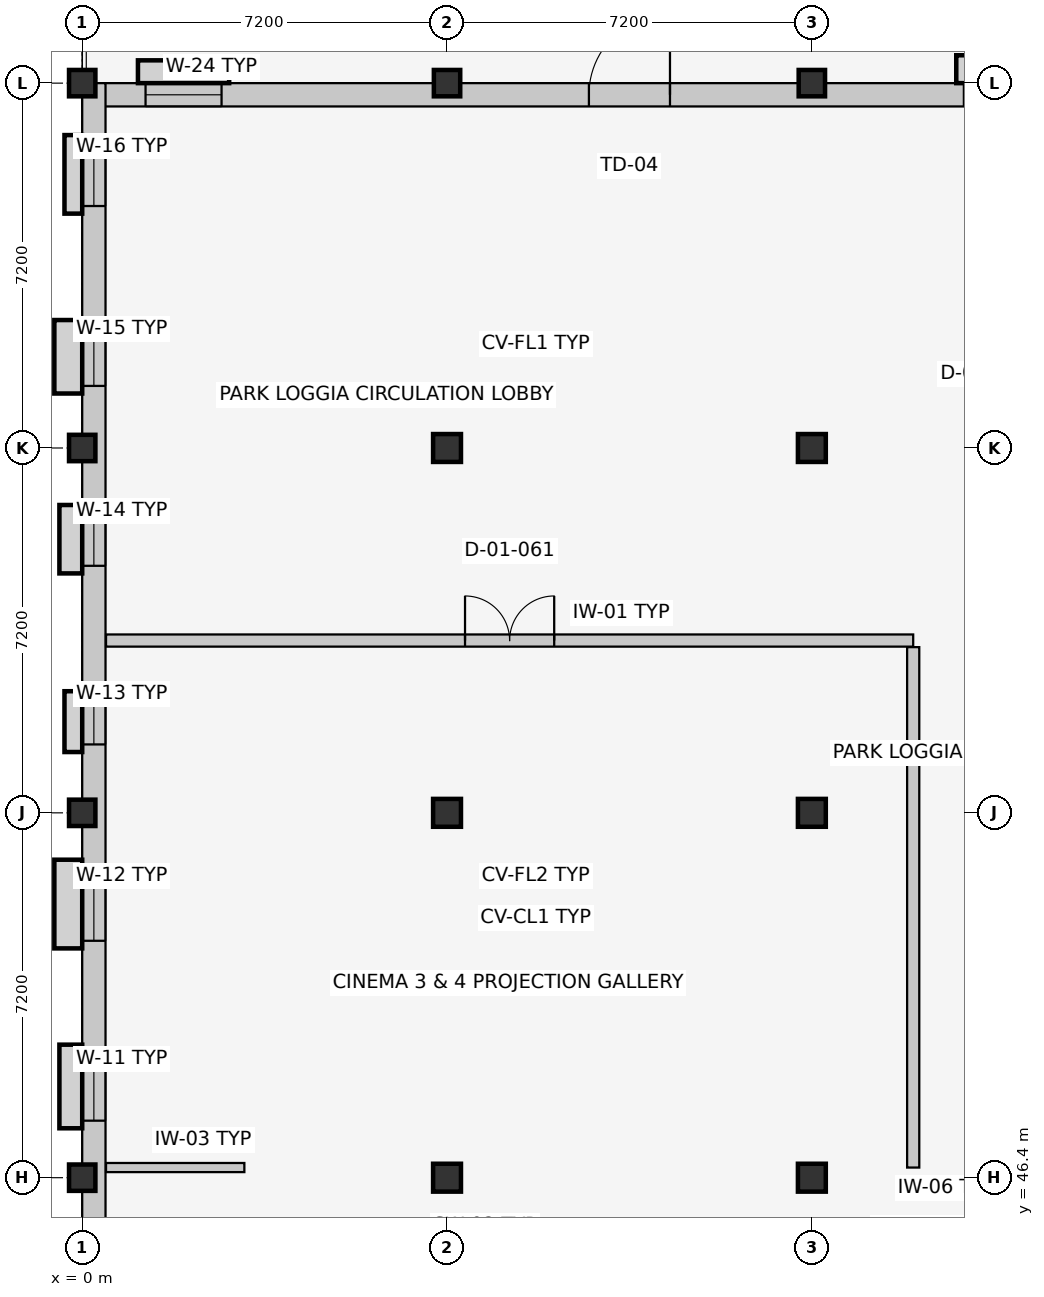
"""IFC4 building model, lengths in metres.
Left out: names, types, materials, properties, quantities, classifications, styles, units other than length and angle.
Written with IfcOpenShell. Run it as: python <this file> out.ifc"""

import sys

from ifc_helpers import new_model, si_unit, direction, frame, frame_2d, origin, origin_2d, place, context, subcontext, project, spatial, rectangle, extrude, element, fill, save


model = new_model("IFC4")
c1 = context("Model", 3, precision=1e-05, world=origin(), true_north=direction((0.0, 1.0)))
c2 = subcontext(c1, "Body", "Model", "MODEL_VIEW")
j1 = project(units=[si_unit("LENGTHUNIT", "METRE"), si_unit("PLANEANGLEUNIT", "RADIAN")], contexts=[c1])
p1 = place(None, origin())
s1 = spatial("IfcSite", under=j1, at=p1, CompositionType="ELEMENT")
p2 = place(p1, origin())
s2 = spatial("IfcBuilding", under=s1, at=p2, CompositionType="ELEMENT")
p3 = place(p2, frame((0.0, 0.0, 5.4)))
s3 = spatial("IfcBuildingStorey", under=s2, at=p3, CompositionType="ELEMENT", Elevation=5.4)
for number, where, z_axis, x_axis in (
    (1, (0.0, 46.4, 0.0), (0.0, 0.0, 1.0), (1.0, 0.0, 0.0)),
    (2, (0.0, 53.6, 0.0), (0.0, 0.0, 1.0), (1.0, 0.0, 0.0)),
    (3, (0.0, 60.8, 0.0), (0.0, 0.0, 1.0), (1.0, 0.0, 0.0)),
    (4, (0.0, 68.0, 0.0), (0.0, 0.0, 1.0), (1.0, 0.0, 0.0)),
):
    element("IfcColumn", number, at=place(p3, frame(where, z_axis=z_axis, x_axis=x_axis)), inside=s3, PredefinedType="COLUMN", context=c2, shape_type="SweptSolid", body=[
        extrude(rectangle(XDim=0.52, YDim=0.52, at=origin_2d()), origin(), (0.0, 0.0, 1.0), 4.2),
    ])
for number, where, z_axis, x_axis in (
    (5, (7.2, 46.4, 0.0), (0.0, 0.0, 1.0), (1.0, 0.0, 0.0)),
    (6, (7.2, 53.6, 0.0), (0.0, 0.0, 1.0), (1.0, 0.0, 0.0)),
    (7, (7.2, 60.8, 0.0), (0.0, 0.0, 1.0), (1.0, 0.0, 0.0)),
):
    element("IfcColumn", number, at=place(p3, frame(where, z_axis=z_axis, x_axis=x_axis)), inside=s3, PredefinedType="COLUMN", context=c2, shape_type="SweptSolid", body=[
        extrude(rectangle(XDim=0.55, YDim=0.55, at=origin_2d()), origin(), (0.0, 0.0, 1.0), 4.2),
    ])
p4 = place(p3, frame((7.2, 68.0, 0.0), z_axis=(0.0, 0.0, 1.0), x_axis=(1.0, 0.0, 0.0)))
e8 = element("IfcColumn", 8, at=p4, inside=s3, PredefinedType="COLUMN", context=c2, shape_type="SweptSolid", body=[
    extrude(rectangle(XDim=0.52, YDim=0.52, at=origin_2d()), origin(), (0.0, 0.0, 1.0), 4.2),
])
for number, where, z_axis, x_axis in (
    (9, (14.4, 46.4, 0.0), (0.0, 0.0, 1.0), (1.0, 0.0, 0.0)),
    (10, (14.4, 53.6, 0.0), (0.0, 0.0, 1.0), (1.0, 0.0, 0.0)),
    (11, (14.4, 60.8, 0.0), (0.0, 0.0, 1.0), (1.0, 0.0, 0.0)),
):
    element("IfcColumn", number, at=place(p3, frame(where, z_axis=z_axis, x_axis=x_axis)), inside=s3, PredefinedType="COLUMN", context=c2, shape_type="SweptSolid", body=[
        extrude(rectangle(XDim=0.55, YDim=0.55, at=origin_2d()), origin(), (0.0, 0.0, 1.0), 4.2),
    ])
p5 = place(p3, frame((14.4, 68.0, 0.0), z_axis=(0.0, 0.0, 1.0), x_axis=(1.0, 0.0, 0.0)))
e12 = element("IfcColumn", 12, at=p5, inside=s3, PredefinedType="COLUMN", context=c2, shape_type="SweptSolid", body=[
    extrude(rectangle(XDim=0.52, YDim=0.52, at=origin_2d()), origin(), (0.0, 0.0, 1.0), 4.2),
])
p6 = place(p3, frame((0.0, 67.77, 0.0), z_axis=(0.0, 0.0, 1.0), x_axis=(1.0, 0.0, 0.0)))
e13 = element("IfcWall", 13, at=p6, inside=s3, PredefinedType="SOLIDWALL", context=c2, shape_type="SweptSolid", body=[
    extrude(rectangle(XDim=36.0, YDim=0.46, at=frame_2d((18.0, 0.0))), origin(), (0.0, 0.0, 1.0), 3.235),
])
p7 = place(p6, frame((10.0, 0.0, 0.0)))
e14 = element("IfcOpeningElement", 14, at=p7, cuts=e13, PredefinedType="OPENING", context=c2, shape_type="SweptSolid", body=[
    extrude(rectangle(XDim=1.6, YDim=2.2, at=frame_2d((0.8, 1.1))), frame((0.0, 0.242, 0.0), z_axis=(0.0, -1.0, 0.0), x_axis=(1.0, 0.0, 0.0)), (0.0, 0.0, 1.0), 0.484),
])
p8 = place(p6, frame((1.25, 0.0, 0.9)))
e15 = element("IfcOpeningElement", 15, at=p8, cuts=e13, PredefinedType="OPENING", context=c2, shape_type="SweptSolid", body=[
    extrude(rectangle(XDim=1.5, YDim=1.75, at=frame_2d((0.75, 0.875))), frame((0.0, 0.242, 0.0), z_axis=(0.0, -1.0, 0.0), x_axis=(1.0, 0.0, 0.0)), (0.0, 0.0, 1.0), 0.484),
])
p9 = place(p6, frame((17.4, 0.0, 0.9)))
e16 = element("IfcOpeningElement", 16, at=p9, cuts=e13, PredefinedType="OPENING", context=c2, shape_type="SweptSolid", body=[
    extrude(rectangle(XDim=1.2, YDim=1.35, at=frame_2d((0.6, 0.675))), frame((0.0, 0.242, 0.0), z_axis=(0.0, -1.0, 0.0), x_axis=(1.0, 0.0, 0.0)), (0.0, 0.0, 1.0), 0.484),
])
p10 = place(p6, frame((25.3, 0.0, 0.9)))
e17 = element("IfcOpeningElement", 17, at=p10, cuts=e13, PredefinedType="OPENING", context=c2, shape_type="SweptSolid", body=[
    extrude(rectangle(XDim=1.4, YDim=1.35, at=frame_2d((0.7, 0.675))), frame((0.0, 0.242, 0.0), z_axis=(0.0, -1.0, 0.0), x_axis=(1.0, 0.0, 0.0)), (0.0, 0.0, 1.0), 0.484),
])
p11 = place(p6, frame((33.475, 0.0, 0.9)))
e18 = element("IfcOpeningElement", 18, at=p11, cuts=e13, PredefinedType="OPENING", context=c2, shape_type="SweptSolid", body=[
    extrude(rectangle(XDim=1.05, YDim=1.45, at=frame_2d((0.525, 0.725))), frame((0.0, 0.242, 0.0), z_axis=(0.0, -1.0, 0.0), x_axis=(1.0, 0.0, 0.0)), (0.0, 0.0, 1.0), 0.484),
])
p12 = place(p3, frame((0.23, 39.2, 0.0), z_axis=(0.0, 0.0, 1.0), x_axis=(0.0, 1.0, 0.0)))
e19 = element("IfcWall", 19, at=p12, inside=s3, PredefinedType="SOLIDWALL", context=c2, shape_type="SweptSolid", body=[
    extrude(rectangle(XDim=28.8, YDim=0.46, at=frame_2d((14.4, 0.0))), origin(), (0.0, 0.0, 1.0), 3.195),
])
p13 = place(p12, frame((1.225, 0.0, 0.9)))
e20 = element("IfcOpeningElement", 20, at=p13, cuts=e19, PredefinedType="OPENING", context=c2, shape_type="SweptSolid", body=[
    extrude(rectangle(XDim=1.15, YDim=1.45, at=frame_2d((0.575, 0.725))), frame((0.0, 0.242, 0.0), z_axis=(0.0, -1.0, 0.0), x_axis=(1.0, 0.0, 0.0)), (0.0, 0.0, 1.0), 0.484),
])
p14 = place(p12, frame((4.775, 0.0, 0.9)))
e21 = element("IfcOpeningElement", 21, at=p14, cuts=e19, PredefinedType="OPENING", context=c2, shape_type="SweptSolid", body=[
    extrude(rectangle(XDim=1.25, YDim=1.45, at=frame_2d((0.625, 0.725))), frame((0.0, 0.242, 0.0), z_axis=(0.0, -1.0, 0.0), x_axis=(1.0, 0.0, 0.0)), (0.0, 0.0, 1.0), 0.484),
])
p15 = place(p12, frame((8.325, 0.0, 0.9)))
e22 = element("IfcOpeningElement", 22, at=p15, cuts=e19, PredefinedType="OPENING", context=c2, shape_type="SweptSolid", body=[
    extrude(rectangle(XDim=1.35, YDim=1.45, at=frame_2d((0.675, 0.725))), frame((0.0, 0.242, 0.0), z_axis=(0.0, -1.0, 0.0), x_axis=(1.0, 0.0, 0.0)), (0.0, 0.0, 1.0), 0.484),
])
p16 = place(p12, frame((11.875, 0.0, 0.9)))
e23 = element("IfcOpeningElement", 23, at=p16, cuts=e19, PredefinedType="OPENING", context=c2, shape_type="SweptSolid", body=[
    extrude(rectangle(XDim=1.45, YDim=1.45, at=frame_2d((0.725, 0.725))), frame((0.0, 0.242, 0.0), z_axis=(0.0, -1.0, 0.0), x_axis=(1.0, 0.0, 0.0)), (0.0, 0.0, 1.0), 0.484),
])
p17 = place(p12, frame((15.75, 0.0, 0.9)))
e24 = element("IfcOpeningElement", 24, at=p17, cuts=e19, PredefinedType="OPENING", context=c2, shape_type="SweptSolid", body=[
    extrude(rectangle(XDim=0.9, YDim=1.6, at=frame_2d((0.45, 0.8))), frame((0.0, 0.242, 0.0), z_axis=(0.0, -1.0, 0.0), x_axis=(1.0, 0.0, 0.0)), (0.0, 0.0, 1.0), 0.484),
])
p18 = place(p12, frame((19.275, 0.0, 0.9)))
e25 = element("IfcOpeningElement", 25, at=p18, cuts=e19, PredefinedType="OPENING", context=c2, shape_type="SweptSolid", body=[
    extrude(rectangle(XDim=1.05, YDim=1.6, at=frame_2d((0.525, 0.8))), frame((0.0, 0.242, 0.0), z_axis=(0.0, -1.0, 0.0), x_axis=(1.0, 0.0, 0.0)), (0.0, 0.0, 1.0), 0.484),
])
p19 = place(p12, frame((22.825, 0.0, 0.9)))
e26 = element("IfcOpeningElement", 26, at=p19, cuts=e19, PredefinedType="OPENING", context=c2, shape_type="SweptSolid", body=[
    extrude(rectangle(XDim=1.15, YDim=1.6, at=frame_2d((0.575, 0.8))), frame((0.0, 0.242, 0.0), z_axis=(0.0, -1.0, 0.0), x_axis=(1.0, 0.0, 0.0)), (0.0, 0.0, 1.0), 0.484),
])
p20 = place(p12, frame((26.375, 0.0, 0.9)))
e27 = element("IfcOpeningElement", 27, at=p20, cuts=e19, PredefinedType="OPENING", context=c2, shape_type="SweptSolid", body=[
    extrude(rectangle(XDim=1.25, YDim=1.6, at=frame_2d((0.625, 0.8))), frame((0.0, 0.242, 0.0), z_axis=(0.0, -1.0, 0.0), x_axis=(1.0, 0.0, 0.0)), (0.0, 0.0, 1.0), 0.484),
])
p21 = place(p3, frame((0.47, 46.6, 0.0), z_axis=(0.0, 0.0, 1.0), x_axis=(1.0, 0.0, 0.0)))
e28 = element("IfcWall", 28, at=p21, inside=s3, PredefinedType="PARTITIONING", context=c2, shape_type="SweptSolid", body=[
    extrude(rectangle(XDim=2.73, YDim=0.18, at=frame_2d((1.365, 0.0))), origin(), (0.0, 0.0, 1.0), 3.265),
])
p22 = place(p3, frame((0.47, 57.0, 0.0), z_axis=(0.0, 0.0, 1.0), x_axis=(1.0, 0.0, 0.0)))
e29 = element("IfcWall", 29, at=p22, inside=s3, PredefinedType="PARTITIONING", context=c2, shape_type="SweptSolid", body=[
    extrude(rectangle(XDim=15.93, YDim=0.24, at=frame_2d((7.965, 0.0))), origin(), (0.0, 0.0, 1.0), 3.94),
])
p23 = place(p22, frame((7.085, 0.0, 0.0)))
e30 = element("IfcOpeningElement", 30, at=p23, cuts=e29, PredefinedType="OPENING", context=c2, shape_type="SweptSolid", body=[
    extrude(rectangle(XDim=1.76, YDim=2.3, at=frame_2d((0.88, 1.15))), frame((0.0, 0.132, 0.0), z_axis=(0.0, -1.0, 0.0), x_axis=(1.0, 0.0, 0.0)), (0.0, 0.0, 1.0), 0.264),
])
p24 = place(p3, frame((16.4, 46.6, 0.0), z_axis=(0.0, 0.0, 1.0), x_axis=(0.0, 1.0, 0.0)))
e31 = element("IfcWall", 31, at=p24, inside=s3, PredefinedType="PARTITIONING", context=c2, shape_type="SweptSolid", body=[
    extrude(rectangle(XDim=10.27, YDim=0.24, at=frame_2d((5.135, 0.0))), origin(), (0.0, 0.0, 1.0), 3.94),
])
p25 = place(p7, origin())
e32 = element("IfcDoor", 32, at=p25, inside=s3, OperationType="SINGLE_SWING_RIGHT", PredefinedType="DOOR", context=c2, shape_type="SweptSolid", body=[
    extrude(rectangle(XDim=1.6, YDim=2.2, at=frame_2d((0.8, 1.1))), frame((0.0, 0.025, 0.0), z_axis=(0.0, -1.0, 0.0), x_axis=(1.0, 0.0, 0.0)), (0.0, 0.0, 1.0), 0.05),
])
fill(e14, e32)
p26 = place(p8, origin())
e33 = element("IfcWindow", 33, at=p26, inside=s3, PartitioningType="SINGLE_PANEL", PredefinedType="WINDOW", context=c2, shape_type="SweptSolid", body=[
    extrude(rectangle(XDim=1.5, YDim=1.75, at=frame_2d((0.75, 0.875))), frame((0.0, 0.03, 0.0), z_axis=(0.0, -1.0, 0.0), x_axis=(1.0, 0.0, 0.0)), (0.0, 0.0, 1.0), 0.06),
])
fill(e15, e33)
p27 = place(p15, origin())
e34 = element("IfcWindow", 34, at=p27, inside=s3, PartitioningType="SINGLE_PANEL", PredefinedType="WINDOW", context=c2, shape_type="SweptSolid", body=[
    extrude(rectangle(XDim=1.35, YDim=1.45, at=frame_2d((0.675, 0.725))), frame((0.0, 0.03, 0.0), z_axis=(0.0, -1.0, 0.0), x_axis=(1.0, 0.0, 0.0)), (0.0, 0.0, 1.0), 0.06),
])
fill(e22, e34)
p28 = place(p16, origin())
e35 = element("IfcWindow", 35, at=p28, inside=s3, PartitioningType="SINGLE_PANEL", PredefinedType="WINDOW", context=c2, shape_type="SweptSolid", body=[
    extrude(rectangle(XDim=1.45, YDim=1.45, at=frame_2d((0.725, 0.725))), frame((0.0, 0.03, 0.0), z_axis=(0.0, -1.0, 0.0), x_axis=(1.0, 0.0, 0.0)), (0.0, 0.0, 1.0), 0.06),
])
fill(e23, e35)
p29 = place(p17, origin())
e36 = element("IfcWindow", 36, at=p29, inside=s3, PartitioningType="SINGLE_PANEL", PredefinedType="WINDOW", context=c2, shape_type="SweptSolid", body=[
    extrude(rectangle(XDim=0.9, YDim=1.6, at=frame_2d((0.45, 0.8))), frame((0.0, 0.03, 0.0), z_axis=(0.0, -1.0, 0.0), x_axis=(1.0, 0.0, 0.0)), (0.0, 0.0, 1.0), 0.06),
])
fill(e24, e36)
p30 = place(p18, origin())
e37 = element("IfcWindow", 37, at=p30, inside=s3, PartitioningType="SINGLE_PANEL", PredefinedType="WINDOW", context=c2, shape_type="SweptSolid", body=[
    extrude(rectangle(XDim=1.05, YDim=1.6, at=frame_2d((0.525, 0.8))), frame((0.0, 0.03, 0.0), z_axis=(0.0, -1.0, 0.0), x_axis=(1.0, 0.0, 0.0)), (0.0, 0.0, 1.0), 0.06),
])
fill(e25, e37)
p31 = place(p19, origin())
e38 = element("IfcWindow", 38, at=p31, inside=s3, PartitioningType="SINGLE_PANEL", PredefinedType="WINDOW", context=c2, shape_type="SweptSolid", body=[
    extrude(rectangle(XDim=1.15, YDim=1.6, at=frame_2d((0.575, 0.8))), frame((0.0, 0.03, 0.0), z_axis=(0.0, -1.0, 0.0), x_axis=(1.0, 0.0, 0.0)), (0.0, 0.0, 1.0), 0.06),
])
fill(e26, e38)
p32 = place(p20, origin())
e39 = element("IfcWindow", 39, at=p32, inside=s3, PartitioningType="SINGLE_PANEL", PredefinedType="WINDOW", context=c2, shape_type="SweptSolid", body=[
    extrude(rectangle(XDim=1.25, YDim=1.6, at=frame_2d((0.625, 0.8))), frame((0.0, 0.03, 0.0), z_axis=(0.0, -1.0, 0.0), x_axis=(1.0, 0.0, 0.0)), (0.0, 0.0, 1.0), 0.06),
])
fill(e27, e39)
p33 = place(p23, origin())
e40 = element("IfcDoor", 40, at=p33, inside=s3, OperationType="DOUBLE_DOOR_SINGLE_SWING", PredefinedType="DOOR", context=c2, shape_type="SweptSolid", body=[
    extrude(rectangle(XDim=1.76, YDim=2.3, at=frame_2d((0.88, 1.15))), frame((0.0, 0.025, 0.0), z_axis=(0.0, -1.0, 0.0), x_axis=(1.0, 0.0, 0.0)), (0.0, 0.0, 1.0), 0.05),
])
fill(e30, e40)
save(model, sys.argv[1])
